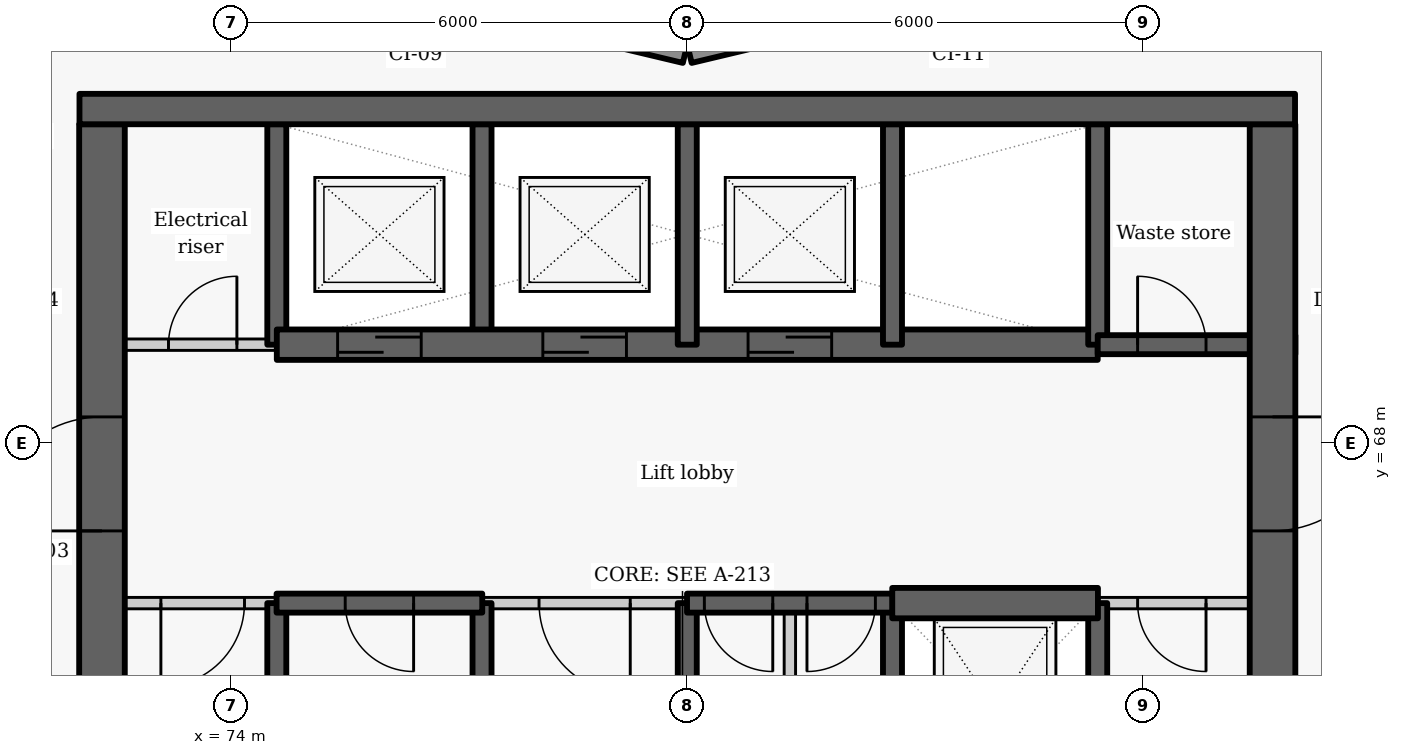
"""IFC4 building model, lengths in metres.
Left out: names, types, materials, properties, quantities, classifications, styles, units other than length and angle.
Written with IfcOpenShell. Run it as: python <this file> out.ifc"""

import sys

from ifc_helpers import new_model, si_unit, direction, frame, frame_2d, origin, place, context, subcontext, project, spatial, rectangle, extrude, element, fill, save


model = new_model("IFC4")
c1 = context("Model", 3, precision=1e-05, world=origin(), true_north=direction((0.0, 1.0)))
c2 = subcontext(c1, "Body", "Model", "MODEL_VIEW")
j1 = project(units=[si_unit("LENGTHUNIT", "METRE"), si_unit("PLANEANGLEUNIT", "RADIAN")], contexts=[c1])
p1 = place(None, origin())
s1 = spatial("IfcSite", under=j1, at=p1, CompositionType="ELEMENT")
p2 = place(p1, origin())
s2 = spatial("IfcBuilding", under=s1, at=p2, CompositionType="ELEMENT")
p3 = place(p2, frame((0.0, 0.0, 61.2)))
s3 = spatial("IfcBuildingStorey", under=s2, at=p3, CompositionType="ELEMENT", Elevation=61.2)
for number, where, z_axis, x_axis in (
    (1, (83.186, 73.881, 0.0), (0.0, 0.0, 1.0), (-0.973, -0.232, 0.0)),
    (2, (79.971, 73.128, 0.0), (0.0, 0.0, 1.0), (-0.973, 0.232, 0.0)),
):
    element("IfcWall", number, at=place(p3, frame(where, z_axis=z_axis, x_axis=x_axis)), inside=s3, PredefinedType="SOLIDWALL", context=c2, shape_type="SweptSolid", body=[
        extrude(rectangle(XDim=3.246, YDim=0.25, at=frame_2d((1.623, 0.0))), origin(), (0.0, 0.0, 1.0), 2.425),
    ])
p4 = place(p3, frame((74.6, 63.1, -0.275), z_axis=(0.0, 0.0, 1.0), x_axis=(0.0, 1.0, 0.0)))
e3 = element("IfcWall", 3, at=p4, inside=s3, PredefinedType="SHEAR", context=c2, shape_type="SweptSolid", body=[
    extrude(rectangle(XDim=2.8, YDim=0.25, at=frame_2d((1.4, 0.0))), origin(), (0.0, 0.0, 1.0), 3.3),
])
p5 = place(p3, frame((74.6, 69.3, -0.275), z_axis=(0.0, 0.0, 1.0), x_axis=(0.0, 1.0, 0.0)))
e4 = element("IfcWall", 4, at=p5, inside=s3, PredefinedType="SHEAR", context=c2, shape_type="SweptSolid", body=[
    extrude(rectangle(XDim=2.9, YDim=0.25, at=frame_2d((1.45, 0.0))), origin(), (0.0, 0.0, 1.0), 3.3),
])
p6 = place(p3, frame((72.0, 69.3, 0.0), z_axis=(0.0, 0.0, 1.0), x_axis=(1.0, 0.0, 0.0)))
e5 = element("IfcWall", 5, at=p6, inside=s3, PredefinedType="PARTITIONING", context=c2, shape_type="SweptSolid", body=[
    extrude(rectangle(XDim=2.6, YDim=0.15, at=frame_2d((1.3, 0.0))), origin(), (0.0, 0.0, 1.0), 3.025),
])
p7 = place(p6, frame((1.175, 0.0, 0.0)))
e6 = element("IfcOpeningElement", 6, at=p7, cuts=e5, PredefinedType="OPENING", context=c2, shape_type="SweptSolid", body=[
    extrude(rectangle(XDim=0.9, YDim=2.1, at=frame_2d((0.45, 1.05))), frame((0.0, 0.085, 0.0), z_axis=(0.0, -1.0, 0.0), x_axis=(1.0, 0.0, 0.0)), (0.0, 0.0, 1.0), 0.17),
])
p8 = place(p3, frame((72.3, 63.1, -0.275), z_axis=(0.0, 0.0, 1.0), x_axis=(0.0, 1.0, 0.0)))
e7 = element("IfcWall", 7, at=p8, inside=s3, PredefinedType="SHEAR", context=c2, shape_type="SweptSolid", body=[
    extrude(rectangle(XDim=9.1, YDim=0.6, at=frame_2d((4.55, 0.0))), origin(), (0.0, 0.0, 1.0), 3.3),
])
p9 = place(p8, frame((3.75, 0.0, 0.275)))
e8 = element("IfcOpeningElement", 8, at=p9, cuts=e7, PredefinedType="OPENING", context=c2, shape_type="SweptSolid", body=[
    extrude(rectangle(XDim=1.5, YDim=2.1, at=frame_2d((0.75, 1.05))), frame((0.0, 0.31, 0.0), z_axis=(0.0, -1.0, 0.0), x_axis=(1.0, 0.0, 0.0)), (0.0, 0.0, 1.0), 0.62),
])
p10 = place(p3, frame((77.3, 63.1, -0.275), z_axis=(0.0, 0.0, 1.0), x_axis=(0.0, 1.0, 0.0)))
e9 = element("IfcWall", 9, at=p10, inside=s3, PredefinedType="SHEAR", context=c2, shape_type="SweptSolid", body=[
    extrude(rectangle(XDim=2.8, YDim=0.25, at=frame_2d((1.4, 0.0))), origin(), (0.0, 0.0, 1.0), 3.3),
])
p11 = place(p3, frame((77.3, 69.3, -0.275), z_axis=(0.0, 0.0, 1.0), x_axis=(0.0, 1.0, 0.0)))
e10 = element("IfcWall", 10, at=p11, inside=s3, PredefinedType="SHEAR", context=c2, shape_type="SweptSolid", body=[
    extrude(rectangle(XDim=2.9, YDim=0.25, at=frame_2d((1.45, 0.0))), origin(), (0.0, 0.0, 1.0), 3.3),
])
p12 = place(p3, frame((74.6, 69.3, -0.275), z_axis=(0.0, 0.0, 1.0), x_axis=(1.0, 0.0, 0.0)))
e11 = element("IfcWall", 11, at=p12, inside=s3, PredefinedType="SHEAR", context=c2, shape_type="SweptSolid", body=[
    extrude(rectangle(XDim=10.8, YDim=0.4, at=frame_2d((5.4, 0.0))), origin(), (0.0, 0.0, 1.0), 3.3),
])
p13 = place(p12, frame((0.8, 0.0, 0.275)))
e12 = element("IfcOpeningElement", 12, at=p13, cuts=e11, PredefinedType="OPENING", context=c2, shape_type="SweptSolid", body=[
    extrude(rectangle(XDim=1.1, YDim=2.1, at=frame_2d((0.55, 1.05))), frame((0.0, 0.21, 0.0), z_axis=(0.0, -1.0, 0.0), x_axis=(1.0, 0.0, 0.0)), (0.0, 0.0, 1.0), 0.42),
])
p14 = place(p12, frame((3.5, 0.0, 0.275)))
e13 = element("IfcOpeningElement", 13, at=p14, cuts=e11, PredefinedType="OPENING", context=c2, shape_type="SweptSolid", body=[
    extrude(rectangle(XDim=1.1, YDim=2.1, at=frame_2d((0.55, 1.05))), frame((0.0, 0.21, 0.0), z_axis=(0.0, -1.0, 0.0), x_axis=(1.0, 0.0, 0.0)), (0.0, 0.0, 1.0), 0.42),
])
p15 = place(p12, frame((6.2, 0.0, 0.275)))
e14 = element("IfcOpeningElement", 14, at=p15, cuts=e11, PredefinedType="OPENING", context=c2, shape_type="SweptSolid", body=[
    extrude(rectangle(XDim=1.1, YDim=2.1, at=frame_2d((0.55, 1.05))), frame((0.0, 0.21, 0.0), z_axis=(0.0, -1.0, 0.0), x_axis=(1.0, 0.0, 0.0)), (0.0, 0.0, 1.0), 0.42),
])
p16 = place(p3, frame((80.0, 63.1, -0.275), z_axis=(0.0, 0.0, 1.0), x_axis=(0.0, 1.0, 0.0)))
e15 = element("IfcWall", 15, at=p16, inside=s3, PredefinedType="SHEAR", context=c2, shape_type="SweptSolid", body=[
    extrude(rectangle(XDim=2.8, YDim=0.25, at=frame_2d((1.4, 0.0))), origin(), (0.0, 0.0, 1.0), 3.3),
])
p17 = place(p3, frame((80.0, 69.3, -0.275), z_axis=(0.0, 0.0, 1.0), x_axis=(0.0, 1.0, 0.0)))
e16 = element("IfcWall", 16, at=p17, inside=s3, PredefinedType="SHEAR", context=c2, shape_type="SweptSolid", body=[
    extrude(rectangle(XDim=2.9, YDim=0.25, at=frame_2d((1.45, 0.0))), origin(), (0.0, 0.0, 1.0), 3.3),
])
p18 = place(p3, frame((82.7, 63.1, -0.275), z_axis=(0.0, 0.0, 1.0), x_axis=(0.0, 1.0, 0.0)))
e17 = element("IfcWall", 17, at=p18, inside=s3, PredefinedType="SHEAR", context=c2, shape_type="SweptSolid", body=[
    extrude(rectangle(XDim=2.8, YDim=0.25, at=frame_2d((1.4, 0.0))), origin(), (0.0, 0.0, 1.0), 3.3),
])
p19 = place(p3, frame((82.7, 69.3, -0.275), z_axis=(0.0, 0.0, 1.0), x_axis=(0.0, 1.0, 0.0)))
e18 = element("IfcWall", 18, at=p19, inside=s3, PredefinedType="SHEAR", context=c2, shape_type="SweptSolid", body=[
    extrude(rectangle(XDim=2.9, YDim=0.25, at=frame_2d((1.45, 0.0))), origin(), (0.0, 0.0, 1.0), 3.3),
])
p20 = place(p3, frame((85.4, 63.1, -0.275), z_axis=(0.0, 0.0, 1.0), x_axis=(0.0, 1.0, 0.0)))
e19 = element("IfcWall", 19, at=p20, inside=s3, PredefinedType="SHEAR", context=c2, shape_type="SweptSolid", body=[
    extrude(rectangle(XDim=2.8, YDim=0.25, at=frame_2d((1.4, 0.0))), origin(), (0.0, 0.0, 1.0), 3.3),
])
p21 = place(p3, frame((85.4, 69.3, -0.275), z_axis=(0.0, 0.0, 1.0), x_axis=(0.0, 1.0, 0.0)))
e20 = element("IfcWall", 20, at=p21, inside=s3, PredefinedType="SHEAR", context=c2, shape_type="SweptSolid", body=[
    extrude(rectangle(XDim=2.9, YDim=0.25, at=frame_2d((1.45, 0.0))), origin(), (0.0, 0.0, 1.0), 3.3),
])
p22 = place(p3, frame((85.4, 69.3, -0.275), z_axis=(0.0, 0.0, 1.0), x_axis=(1.0, 0.0, 0.0)))
e21 = element("IfcWall", 21, at=p22, inside=s3, PredefinedType="SHEAR", context=c2, shape_type="SweptSolid", body=[
    extrude(rectangle(XDim=2.6, YDim=0.25, at=frame_2d((1.3, 0.0))), origin(), (0.0, 0.0, 1.0), 3.3),
])
p23 = place(p22, frame((0.525, 0.0, 0.275)))
e22 = element("IfcOpeningElement", 22, at=p23, cuts=e21, PredefinedType="OPENING", context=c2, shape_type="SweptSolid", body=[
    extrude(rectangle(XDim=0.9, YDim=2.1, at=frame_2d((0.45, 1.05))), frame((0.0, 0.135, 0.0), z_axis=(0.0, -1.0, 0.0), x_axis=(1.0, 0.0, 0.0)), (0.0, 0.0, 1.0), 0.27),
])
p24 = place(p3, frame((87.7, 72.2, -0.275), z_axis=(0.0, 0.0, 1.0), x_axis=(0.0, -1.0, 0.0)))
e23 = element("IfcWall", 23, at=p24, inside=s3, PredefinedType="SHEAR", context=c2, shape_type="SweptSolid", body=[
    extrude(rectangle(XDim=15.6, YDim=0.6, at=frame_2d((7.8, 0.0))), origin(), (0.0, 0.0, 1.0), 3.3),
])
p25 = place(p24, frame((3.85, 0.0, 0.275)))
e24 = element("IfcOpeningElement", 24, at=p25, cuts=e23, PredefinedType="OPENING", context=c2, shape_type="SweptSolid", body=[
    extrude(rectangle(XDim=1.5, YDim=2.1, at=frame_2d((0.75, 1.05))), frame((0.0, 0.31, 0.0), z_axis=(0.0, -1.0, 0.0), x_axis=(1.0, 0.0, 0.0)), (0.0, 0.0, 1.0), 0.62),
])
p26 = place(p24, frame((11.8, 0.0, 0.275)))
e25 = element("IfcOpeningElement", 25, at=p26, cuts=e23, PredefinedType="OPENING", context=c2, shape_type="SweptSolid", body=[
    extrude(rectangle(XDim=1.1, YDim=2.1, at=frame_2d((0.55, 1.05))), frame((0.0, 0.31, 0.0), z_axis=(0.0, -1.0, 0.0), x_axis=(1.0, 0.0, 0.0)), (0.0, 0.0, 1.0), 0.62),
])
p27 = place(p3, frame((74.603, 65.9, 0.0), z_axis=(0.0, 0.0, 1.0), x_axis=(-1.0, 0.0, 0.0)))
e26 = element("IfcWall", 26, at=p27, inside=s3, PredefinedType="PARTITIONING", context=c2, shape_type="SweptSolid", body=[
    extrude(rectangle(XDim=2.603, YDim=0.15, at=frame_2d((1.302, 0.0))), origin(), (0.0, 0.0, 1.0), 3.025),
])
p28 = place(p27, frame((0.428, 0.0, 0.0)))
e27 = element("IfcOpeningElement", 27, at=p28, cuts=e26, PredefinedType="OPENING", context=c2, shape_type="SweptSolid", body=[
    extrude(rectangle(XDim=1.1, YDim=2.1, at=frame_2d((0.55, 1.05))), frame((0.0, 0.085, 0.0), z_axis=(0.0, -1.0, 0.0), x_axis=(1.0, 0.0, 0.0)), (0.0, 0.0, 1.0), 0.17),
])
p29 = place(p3, frame((80.003, 65.9, 0.0), z_axis=(0.0, 0.0, 1.0), x_axis=(-1.0, 0.0, 0.0)))
e28 = element("IfcWall", 28, at=p29, inside=s3, PredefinedType="PARTITIONING", context=c2, shape_type="SweptSolid", body=[
    extrude(rectangle(XDim=2.706, YDim=0.15, at=frame_2d((1.353, 0.0))), origin(), (0.0, 0.0, 1.0), 3.025),
])
p30 = place(p29, frame((0.753, 0.0, 0.0)))
e29 = element("IfcOpeningElement", 29, at=p30, cuts=e28, PredefinedType="OPENING", context=c2, shape_type="SweptSolid", body=[
    extrude(rectangle(XDim=1.2, YDim=2.1, at=frame_2d((0.6, 1.05))), frame((0.0, 0.085, 0.0), z_axis=(0.0, -1.0, 0.0), x_axis=(1.0, 0.0, 0.0)), (0.0, 0.0, 1.0), 0.17),
])
p31 = place(p3, frame((88.0, 65.9, 0.0), z_axis=(0.0, 0.0, 1.0), x_axis=(-1.0, 0.0, 0.0)))
e30 = element("IfcWall", 30, at=p31, inside=s3, PredefinedType="PARTITIONING", context=c2, shape_type="SweptSolid", body=[
    extrude(rectangle(XDim=2.603, YDim=0.15, at=frame_2d((1.302, 0.0))), origin(), (0.0, 0.0, 1.0), 3.025),
])
p32 = place(p31, frame((1.175, 0.0, 0.0)))
e31 = element("IfcOpeningElement", 31, at=p32, cuts=e30, PredefinedType="OPENING", context=c2, shape_type="SweptSolid", body=[
    extrude(rectangle(XDim=0.9, YDim=2.1, at=frame_2d((0.45, 1.05))), frame((0.0, 0.085, 0.0), z_axis=(0.0, -1.0, 0.0), x_axis=(1.0, 0.0, 0.0)), (0.0, 0.0, 1.0), 0.17),
])
p33 = place(p3, frame((77.303, 65.9, -0.275), z_axis=(0.0, 0.0, 1.0), x_axis=(-1.0, 0.0, 0.0)))
e32 = element("IfcWall", 32, at=p33, inside=s3, PredefinedType="SHEAR", context=c2, shape_type="SweptSolid", body=[
    extrude(rectangle(XDim=2.706, YDim=0.25, at=frame_2d((1.353, 0.0))), origin(), (0.0, 0.0, 1.0), 3.3),
])
p34 = place(p33, frame((0.903, 0.0, 0.275)))
e33 = element("IfcOpeningElement", 33, at=p34, cuts=e32, PredefinedType="OPENING", context=c2, shape_type="SweptSolid", body=[
    extrude(rectangle(XDim=0.9, YDim=2.1, at=frame_2d((0.45, 1.05))), frame((0.0, 0.135, 0.0), z_axis=(0.0, -1.0, 0.0), x_axis=(1.0, 0.0, 0.0)), (0.0, 0.0, 1.0), 0.27),
])
p35 = place(p3, frame((82.703, 65.9, -0.275), z_axis=(0.0, 0.0, 1.0), x_axis=(-1.0, 0.0, 0.0)))
e34 = element("IfcWall", 34, at=p35, inside=s3, PredefinedType="SHEAR", context=c2, shape_type="SweptSolid", body=[
    extrude(rectangle(XDim=2.706, YDim=0.25, at=frame_2d((1.353, 0.0))), origin(), (0.0, 0.0, 1.0), 3.3),
])
p36 = place(p35, frame((1.578, 0.0, 0.275)))
e35 = element("IfcOpeningElement", 35, at=p36, cuts=e34, PredefinedType="OPENING", context=c2, shape_type="SweptSolid", body=[
    extrude(rectangle(XDim=0.9, YDim=2.1, at=frame_2d((0.45, 1.05))), frame((0.0, 0.135, 0.0), z_axis=(0.0, -1.0, 0.0), x_axis=(1.0, 0.0, 0.0)), (0.0, 0.0, 1.0), 0.27),
])
p37 = place(p35, frame((0.228, 0.0, 0.275)))
e36 = element("IfcOpeningElement", 36, at=p37, cuts=e34, PredefinedType="OPENING", context=c2, shape_type="SweptSolid", body=[
    extrude(rectangle(XDim=0.9, YDim=2.1, at=frame_2d((0.45, 1.05))), frame((0.0, 0.135, 0.0), z_axis=(0.0, -1.0, 0.0), x_axis=(1.0, 0.0, 0.0)), (0.0, 0.0, 1.0), 0.27),
])
p38 = place(p3, frame((82.697, 65.9, -0.275), z_axis=(0.0, 0.0, 1.0), x_axis=(1.0, 0.0, 0.0)))
e37 = element("IfcWall", 37, at=p38, inside=s3, PredefinedType="SHEAR", context=c2, shape_type="SweptSolid", body=[
    extrude(rectangle(XDim=2.706, YDim=0.4, at=frame_2d((1.353, 0.0))), origin(), (0.0, 0.0, 1.0), 3.3),
])
p39 = place(p3, frame((81.35, 63.1, 0.0), z_axis=(0.0, 0.0, 1.0), x_axis=(0.0, 1.0, 0.0)))
e38 = element("IfcWall", 38, at=p39, inside=s3, PredefinedType="PARTITIONING", context=c2, shape_type="SweptSolid", body=[
    extrude(rectangle(XDim=2.8, YDim=0.15, at=frame_2d((1.4, 0.0))), origin(), (0.0, 0.0, 1.0), 3.025),
])
p40 = place(p3, frame((72.004, 72.4, -0.275), z_axis=(0.0, 0.0, 1.0), x_axis=(1.0, 0.0, 0.0)))
e39 = element("IfcWall", 39, at=p40, inside=s3, PredefinedType="SHEAR", context=c2, shape_type="SweptSolid", body=[
    extrude(rectangle(XDim=15.992, YDim=0.4, at=frame_2d((7.996, 0.0))), origin(), (0.0, 0.0, 1.0), 3.3),
])
p41 = place(p7, origin())
e40 = element("IfcDoor", 40, at=p41, inside=s3, OperationType="SINGLE_SWING_RIGHT", PredefinedType="DOOR", context=c2, shape_type="SweptSolid", body=[
    extrude(rectangle(XDim=0.9, YDim=2.1, at=frame_2d((0.45, 1.05))), frame((0.0, 0.025, 0.0), z_axis=(0.0, -1.0, 0.0), x_axis=(1.0, 0.0, 0.0)), (0.0, 0.0, 1.0), 0.05),
])
fill(e6, e40)
p42 = place(p13, origin())
e41 = element("IfcDoor", 41, at=p42, inside=s3, OperationType="SLIDING_TO_LEFT", PredefinedType="DOOR", context=c2, shape_type="SweptSolid", body=[
    extrude(rectangle(XDim=1.1, YDim=2.1, at=frame_2d((0.55, 1.05))), frame((0.0, 0.025, 0.0), z_axis=(0.0, -1.0, 0.0), x_axis=(1.0, 0.0, 0.0)), (0.0, 0.0, 1.0), 0.05),
])
fill(e12, e41)
p43 = place(p14, origin())
e42 = element("IfcDoor", 42, at=p43, inside=s3, OperationType="SLIDING_TO_LEFT", PredefinedType="DOOR", context=c2, shape_type="SweptSolid", body=[
    extrude(rectangle(XDim=1.1, YDim=2.1, at=frame_2d((0.55, 1.05))), frame((0.0, 0.025, 0.0), z_axis=(0.0, -1.0, 0.0), x_axis=(1.0, 0.0, 0.0)), (0.0, 0.0, 1.0), 0.05),
])
fill(e13, e42)
p44 = place(p15, origin())
e43 = element("IfcDoor", 43, at=p44, inside=s3, OperationType="SLIDING_TO_LEFT", PredefinedType="DOOR", context=c2, shape_type="SweptSolid", body=[
    extrude(rectangle(XDim=1.1, YDim=2.1, at=frame_2d((0.55, 1.05))), frame((0.0, 0.025, 0.0), z_axis=(0.0, -1.0, 0.0), x_axis=(1.0, 0.0, 0.0)), (0.0, 0.0, 1.0), 0.05),
])
fill(e14, e43)
p45 = place(p23, origin())
e44 = element("IfcDoor", 44, at=p45, inside=s3, OperationType="SINGLE_SWING_LEFT", PredefinedType="DOOR", context=c2, shape_type="SweptSolid", body=[
    extrude(rectangle(XDim=0.9, YDim=2.1, at=frame_2d((0.45, 1.05))), frame((0.0, 0.025, 0.0), z_axis=(0.0, -1.0, 0.0), x_axis=(1.0, 0.0, 0.0)), (0.0, 0.0, 1.0), 0.05),
])
fill(e22, e44)
p46 = place(p28, origin())
e45 = element("IfcDoor", 45, at=p46, inside=s3, OperationType="SINGLE_SWING_RIGHT", PredefinedType="DOOR", context=c2, shape_type="SweptSolid", body=[
    extrude(rectangle(XDim=1.1, YDim=2.1, at=frame_2d((0.55, 1.05))), frame((0.0, 0.025, 0.0), z_axis=(0.0, -1.0, 0.0), x_axis=(1.0, 0.0, 0.0)), (0.0, 0.0, 1.0), 0.05),
])
fill(e27, e45)
p47 = place(p34, origin())
e46 = element("IfcDoor", 46, at=p47, inside=s3, OperationType="SINGLE_SWING_LEFT", PredefinedType="DOOR", context=c2, shape_type="SweptSolid", body=[
    extrude(rectangle(XDim=0.9, YDim=2.1, at=frame_2d((0.45, 1.05))), frame((0.0, 0.025, 0.0), z_axis=(0.0, -1.0, 0.0), x_axis=(1.0, 0.0, 0.0)), (0.0, 0.0, 1.0), 0.05),
])
fill(e33, e46)
p48 = place(p30, origin())
e47 = element("IfcDoor", 47, at=p48, inside=s3, OperationType="DOUBLE_DOOR_SINGLE_SWING", PredefinedType="DOOR", context=c2, shape_type="SweptSolid", body=[
    extrude(rectangle(XDim=1.2, YDim=2.1, at=frame_2d((0.6, 1.05))), frame((0.0, 0.025, 0.0), z_axis=(0.0, -1.0, 0.0), x_axis=(1.0, 0.0, 0.0)), (0.0, 0.0, 1.0), 0.05),
])
fill(e29, e47)
p49 = place(p36, origin())
e48 = element("IfcDoor", 48, at=p49, inside=s3, OperationType="SINGLE_SWING_LEFT", PredefinedType="DOOR", context=c2, shape_type="SweptSolid", body=[
    extrude(rectangle(XDim=0.9, YDim=2.1, at=frame_2d((0.45, 1.05))), frame((0.0, 0.025, 0.0), z_axis=(0.0, -1.0, 0.0), x_axis=(1.0, 0.0, 0.0)), (0.0, 0.0, 1.0), 0.05),
])
fill(e35, e48)
p50 = place(p37, origin())
e49 = element("IfcDoor", 49, at=p50, inside=s3, OperationType="SINGLE_SWING_RIGHT", PredefinedType="DOOR", context=c2, shape_type="SweptSolid", body=[
    extrude(rectangle(XDim=0.9, YDim=2.1, at=frame_2d((0.45, 1.05))), frame((0.0, 0.025, 0.0), z_axis=(0.0, -1.0, 0.0), x_axis=(1.0, 0.0, 0.0)), (0.0, 0.0, 1.0), 0.05),
])
fill(e36, e49)
p51 = place(p32, origin())
e50 = element("IfcDoor", 50, at=p51, inside=s3, OperationType="SINGLE_SWING_LEFT", PredefinedType="DOOR", context=c2, shape_type="SweptSolid", body=[
    extrude(rectangle(XDim=0.9, YDim=2.1, at=frame_2d((0.45, 1.05))), frame((0.0, 0.025, 0.0), z_axis=(0.0, -1.0, 0.0), x_axis=(1.0, 0.0, 0.0)), (0.0, 0.0, 1.0), 0.05),
])
fill(e31, e50)
p52 = place(p25, origin())
e51 = element("IfcDoor", 51, at=p52, inside=s3, OperationType="DOUBLE_DOOR_SINGLE_SWING", PredefinedType="DOOR", context=c2, shape_type="SweptSolid", body=[
    extrude(rectangle(XDim=1.5, YDim=2.1, at=frame_2d((0.75, 1.05))), frame((0.0, 0.025, 0.0), z_axis=(0.0, -1.0, 0.0), x_axis=(1.0, 0.0, 0.0)), (0.0, 0.0, 1.0), 0.05),
])
fill(e24, e51)
p53 = place(p9, origin())
e52 = element("IfcDoor", 52, at=p53, inside=s3, OperationType="DOUBLE_DOOR_SINGLE_SWING", PredefinedType="DOOR", context=c2, shape_type="SweptSolid", body=[
    extrude(rectangle(XDim=1.5, YDim=2.1, at=frame_2d((0.75, 1.05))), frame((0.0, 0.025, 0.0), z_axis=(0.0, -1.0, 0.0), x_axis=(1.0, 0.0, 0.0)), (0.0, 0.0, 1.0), 0.05),
])
fill(e8, e52)
save(model, sys.argv[1])
